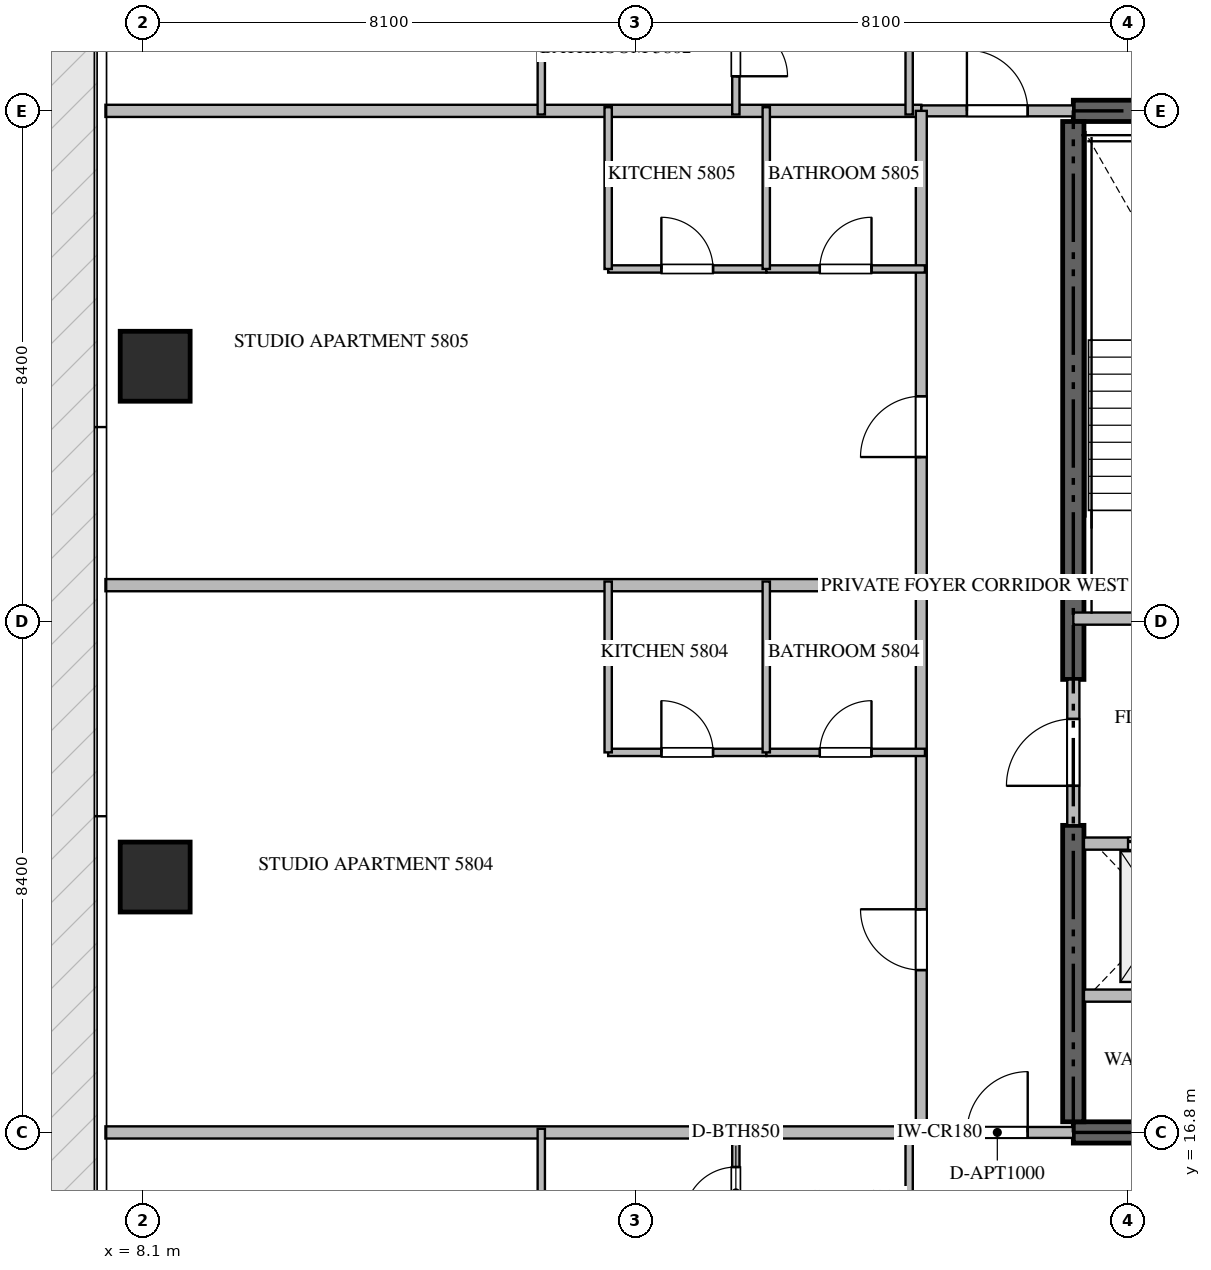
"""IFC4 building model, lengths in metres.
Left out: names, types, materials, properties, quantities, classifications, styles, units other than length and angle.
Written with IfcOpenShell. Run it as: python <this file> out.ifc"""

import sys

from ifc_helpers import new_model, si_unit, direction, frame, frame_2d, origin, origin_2d, place, context, subcontext, project, spatial, rectangle, extrude, source, transform, mapped, element, fill, save


model = new_model("IFC4")
c1 = context("Model", 3, precision=1e-05, world=origin(), true_north=direction((0.0, 1.0)))
c2 = subcontext(c1, "Body", "Model", "MODEL_VIEW")
j1 = project(units=[si_unit("LENGTHUNIT", "METRE"), si_unit("PLANEANGLEUNIT", "RADIAN")], contexts=[c1])
p1 = place(None, origin())
s1 = spatial("IfcSite", under=j1, at=p1, CompositionType="ELEMENT")
p2 = place(p1, origin())
s2 = spatial("IfcBuilding", under=s1, at=p2, CompositionType="ELEMENT")
p3 = place(p2, frame((0.0, 0.0, 233.55)))
s3 = spatial("IfcBuildingStorey", under=s2, at=p3, CompositionType="ELEMENT", Elevation=233.55)
for number, where, z_axis, x_axis in (
    (1, (23.4, 16.8, -0.26), (0.0, 0.0, 1.0), (1.0, 0.0, 0.0)),
    (2, (41.4, 33.6, -0.26), (0.0, 0.0, 1.0), (-1.0, 0.0, 0.0)),
):
    element("IfcWall", number, at=place(p3, frame(where, z_axis=z_axis, x_axis=x_axis)), inside=s3, PredefinedType="SHEAR", context=c2, shape_type="SweptSolid", body=[
        extrude(rectangle(XDim=18.0, YDim=0.35, at=frame_2d((9.0, 0.0))), origin(), (0.0, 0.0, 1.0), 3.848),
    ])
p4 = place(p3, frame((23.4, 16.975, -0.26), z_axis=(0.0, 0.0, 1.0), x_axis=(0.0, 1.0, 0.0)))
e3 = element("IfcWall", 3, at=p4, inside=s3, PredefinedType="SHEAR", context=c2, shape_type="SweptSolid", body=[
    extrude(rectangle(XDim=4.875, YDim=0.35, at=frame_2d((2.438, 0.0))), origin(), (0.0, 0.0, 1.0), 3.848),
])
p5 = place(p3, frame((23.4, 24.25, -0.26), z_axis=(0.0, 0.0, 1.0), x_axis=(0.0, 1.0, 0.0)))
e4 = element("IfcWall", 4, at=p5, inside=s3, PredefinedType="SHEAR", context=c2, shape_type="SweptSolid", body=[
    extrude(rectangle(XDim=9.175, YDim=0.35, at=frame_2d((4.587, 0.0))), origin(), (0.0, 0.0, 1.0), 3.848),
])
m1 = source(origin(), c2, "Body", "SweptSolid", [
    extrude(rectangle(XDim=1.15, YDim=1.15, at=origin_2d()), origin(), (0.0, 0.0, 1.0), 3.85),
])
for number, where, z_axis, x_axis in (
    (5, (8.3, 21.0, -0.26), (0.0, 0.0, 1.0), (1.0, 0.0, 0.0)),
    (6, (8.3, 29.4, -0.26), (0.0, 0.0, 1.0), (1.0, 0.0, 0.0)),
):
    element("IfcColumn", number, at=place(p3, frame(where, z_axis=z_axis, x_axis=x_axis)), inside=s3, PredefinedType="COLUMN", context=c2, shape_type="MappedRepresentation", body=[
        mapped(m1, transform((0.0, 0.0, 0.0), scale=1.0)),
    ])
p6 = place(p3, frame((23.4, 25.25, 0.0), z_axis=(0.0, 0.0, 1.0), x_axis=(1.0, 0.0, 0.0)))
e7 = element("IfcWall", 7, at=p6, inside=s3, PredefinedType="STANDARD", context=c2, shape_type="SweptSolid", body=[
    extrude(rectangle(XDim=4.45, YDim=0.2, at=frame_2d((2.225, 0.0))), origin(), (0.0, 0.0, 1.0), 3.59),
])
p7 = place(p6, frame((1.65, 0.0, 0.0)))
e8 = element("IfcOpeningElement", 8, at=p7, cuts=e7, PredefinedType="OPENING", context=c2, shape_type="SweptSolid", body=[
    extrude(rectangle(XDim=1.1, YDim=2.15, at=frame_2d((0.55, 1.075))), frame((0.0, 0.11, 0.0), z_axis=(0.0, -1.0, 0.0), x_axis=(1.0, 0.0, 0.0)), (0.0, 0.0, 1.0), 0.22),
])
p8 = place(p3, frame((23.575, 21.55, 0.0), z_axis=(0.0, 0.0, 1.0), x_axis=(1.0, 0.0, 0.0)))
e9 = element("IfcWall", 9, at=p8, inside=s3, PredefinedType="STANDARD", context=c2, shape_type="SweptSolid", body=[
    extrude(rectangle(XDim=2.475, YDim=0.2, at=frame_2d((1.238, 0.0))), origin(), (0.0, 0.0, 1.0), 3.59),
])
p9 = place(p8, frame((0.725, 0.0, 0.0)))
e10 = element("IfcOpeningElement", 10, at=p9, cuts=e9, PredefinedType="OPENING", context=c2, shape_type="SweptSolid", body=[
    extrude(rectangle(XDim=1.2, YDim=2.2, at=frame_2d((0.6, 1.1))), frame((0.0, 0.11, 0.0), z_axis=(0.0, -1.0, 0.0), x_axis=(1.0, 0.0, 0.0)), (0.0, 0.0, 1.0), 0.22),
])
p10 = place(p3, frame((23.575, 19.05, 0.0), z_axis=(0.0, 0.0, 1.0), x_axis=(1.0, 0.0, 0.0)))
e11 = element("IfcWall", 11, at=p10, inside=s3, PredefinedType="STANDARD", context=c2, shape_type="SweptSolid", body=[
    extrude(rectangle(XDim=2.475, YDim=0.2, at=frame_2d((1.238, 0.0))), origin(), (0.0, 0.0, 1.0), 3.59),
])
p11 = place(p3, frame((23.4, 21.852, 0.0), z_axis=(0.0, 0.0, 1.0), x_axis=(0.0, 1.0, 0.0)))
e12 = element("IfcWall", 12, at=p11, inside=s3, PredefinedType="STANDARD", context=c2, shape_type="SweptSolid", body=[
    extrude(rectangle(XDim=2.396, YDim=0.2, at=frame_2d((1.198, 0.0))), origin(), (0.0, 0.0, 1.0), 3.59),
])
p12 = place(p11, frame((0.648, 0.0, 0.0)))
e13 = element("IfcOpeningElement", 13, at=p12, cuts=e12, PredefinedType="OPENING", context=c2, shape_type="SweptSolid", body=[
    extrude(rectangle(XDim=1.1, YDim=2.15, at=frame_2d((0.55, 1.075))), frame((0.0, 0.11, 0.0), z_axis=(0.0, -1.0, 0.0), x_axis=(1.0, 0.0, 0.0)), (0.0, 0.0, 1.0), 0.22),
])
p13 = place(p3, frame((7.482, 25.8, 0.0), z_axis=(0.0, 0.0, 1.0), x_axis=(1.0, 0.0, 0.0)))
e14 = element("IfcWall", 14, at=p13, inside=s3, PredefinedType="PARTITIONING", context=c2, shape_type="SweptSolid", body=[
    extrude(rectangle(XDim=13.538, YDim=0.2, at=frame_2d((6.769, 0.0))), origin(), (0.0, 0.0, 1.0), 3.59),
])
for number, where, z_axis, x_axis in (
    (15, (7.482, 16.8, 0.0), (0.0, 0.0, 1.0), (1.0, 0.0, 0.0)),
    (16, (7.482, 33.6, 0.0), (0.0, 0.0, 1.0), (1.0, 0.0, 0.0)),
):
    element("IfcWall", number, at=place(p3, frame(where, z_axis=z_axis, x_axis=x_axis)), inside=s3, PredefinedType="PARTITIONING", context=c2, shape_type="SweptSolid", body=[
        extrude(rectangle(XDim=13.418, YDim=0.2, at=frame_2d((6.709, 0.0))), origin(), (0.0, 0.0, 1.0), 3.59),
    ])
p14 = place(p3, frame((20.902, 16.8, 0.0), z_axis=(0.0, 0.0, 1.0), x_axis=(1.0, 0.0, 0.0)))
e17 = element("IfcWall", 17, at=p14, inside=s3, PredefinedType="PARTITIONING", context=c2, shape_type="SweptSolid", body=[
    extrude(rectangle(XDim=2.496, YDim=0.18, at=frame_2d((1.248, 0.0))), origin(), (0.0, 0.0, 1.0), 3.59),
])
p15 = place(p14, frame((0.748, 0.0, 0.0)))
e18 = element("IfcOpeningElement", 18, at=p15, cuts=e17, PredefinedType="OPENING", context=c2, shape_type="SweptSolid", body=[
    extrude(rectangle(XDim=1.0, YDim=2.15, at=frame_2d((0.5, 1.075))), frame((0.0, 0.1, 0.0), z_axis=(0.0, -1.0, 0.0), x_axis=(1.0, 0.0, 0.0)), (0.0, 0.0, 1.0), 0.2),
])
p16 = place(p3, frame((20.902, 33.6, 0.0), z_axis=(0.0, 0.0, 1.0), x_axis=(1.0, 0.0, 0.0)))
e19 = element("IfcWall", 19, at=p16, inside=s3, PredefinedType="PARTITIONING", context=c2, shape_type="SweptSolid", body=[
    extrude(rectangle(XDim=2.496, YDim=0.18, at=frame_2d((1.248, 0.0))), origin(), (0.0, 0.0, 1.0), 3.59),
])
p17 = place(p16, frame((0.748, 0.0, 0.0)))
e20 = element("IfcOpeningElement", 20, at=p17, cuts=e19, PredefinedType="OPENING", context=c2, shape_type="SweptSolid", body=[
    extrude(rectangle(XDim=1.0, YDim=2.15, at=frame_2d((0.5, 1.075))), frame((0.0, 0.1, 0.0), z_axis=(0.0, -1.0, 0.0), x_axis=(1.0, 0.0, 0.0)), (0.0, 0.0, 1.0), 0.2),
])
p18 = place(p3, frame((20.9, 16.8, 0.0), z_axis=(0.0, 0.0, 1.0), x_axis=(0.0, 1.0, 0.0)))
e21 = element("IfcWall", 21, at=p18, inside=s3, PredefinedType="PARTITIONING", context=c2, shape_type="SweptSolid", body=[
    extrude(rectangle(XDim=16.8, YDim=0.18, at=frame_2d((8.4, 0.0))), origin(), (0.0, 0.0, 1.0), 3.59),
])
p19 = place(p18, frame((2.67, 0.0, 0.0)))
e22 = element("IfcOpeningElement", 22, at=p19, cuts=e21, PredefinedType="OPENING", context=c2, shape_type="SweptSolid", body=[
    extrude(rectangle(XDim=1.0, YDim=2.15, at=frame_2d((0.5, 1.075))), frame((0.0, 0.1, 0.0), z_axis=(0.0, -1.0, 0.0), x_axis=(1.0, 0.0, 0.0)), (0.0, 0.0, 1.0), 0.2),
])
p20 = place(p18, frame((11.107, 0.0, 0.0)))
e23 = element("IfcOpeningElement", 23, at=p20, cuts=e21, PredefinedType="OPENING", context=c2, shape_type="SweptSolid", body=[
    extrude(rectangle(XDim=1.0, YDim=2.15, at=frame_2d((0.5, 1.075))), frame((0.0, 0.1, 0.0), z_axis=(0.0, -1.0, 0.0), x_axis=(1.0, 0.0, 0.0)), (0.0, 0.0, 1.0), 0.2),
])
p21 = place(p3, frame((20.7, 14.05, 0.0), z_axis=(0.0, 0.0, 1.0), x_axis=(0.0, 1.0, 0.0)))
e24 = element("IfcWall", 24, at=p21, inside=s3, PredefinedType="PARTITIONING", context=c2, shape_type="SweptSolid", body=[
    extrude(rectangle(XDim=2.81, YDim=0.12, at=frame_2d((1.405, 0.0))), origin(), (0.0, 0.0, 1.0), 3.59),
])
p22 = place(p3, frame((14.65, 14.75, 0.0), z_axis=(0.0, 0.0, 1.0), x_axis=(0.0, 1.0, 0.0)))
e25 = element("IfcWall", 25, at=p22, inside=s3, PredefinedType="PARTITIONING", context=c2, shape_type="SweptSolid", body=[
    extrude(rectangle(XDim=2.11, YDim=0.12, at=frame_2d((1.055, 0.0))), origin(), (0.0, 0.0, 1.0), 3.59),
])
p23 = place(p3, frame((17.85, 14.752, 0.0), z_axis=(0.0, 0.0, 1.0), x_axis=(0.0, 1.0, 0.0)))
e26 = element("IfcWall", 26, at=p23, inside=s3, PredefinedType="PARTITIONING", context=c2, shape_type="SweptSolid", body=[
    extrude(rectangle(XDim=2.108, YDim=0.12, at=frame_2d((1.054, 0.0))), origin(), (0.0, 0.0, 1.0), 3.59),
])
p24 = place(p23, frame((0.629, 0.0, 0.0)))
e27 = element("IfcOpeningElement", 27, at=p24, cuts=e26, PredefinedType="OPENING", context=c2, shape_type="SweptSolid", body=[
    extrude(rectangle(XDim=0.85, YDim=2.1, at=frame_2d((0.425, 1.05))), frame((0.0, 0.07, 0.0), z_axis=(0.0, -1.0, 0.0), x_axis=(1.0, 0.0, 0.0)), (0.0, 0.0, 1.0), 0.14),
])
p25 = place(p3, frame((20.7, 36.35, 0.0), z_axis=(0.0, 0.0, 1.0), x_axis=(0.0, -1.0, 0.0)))
e28 = element("IfcWall", 28, at=p25, inside=s3, PredefinedType="PARTITIONING", context=c2, shape_type="SweptSolid", body=[
    extrude(rectangle(XDim=2.81, YDim=0.12, at=frame_2d((1.405, 0.0))), origin(), (0.0, 0.0, 1.0), 3.59),
])
p26 = place(p3, frame((14.65, 35.65, 0.0), z_axis=(0.0, 0.0, 1.0), x_axis=(0.0, -1.0, 0.0)))
e29 = element("IfcWall", 29, at=p26, inside=s3, PredefinedType="PARTITIONING", context=c2, shape_type="SweptSolid", body=[
    extrude(rectangle(XDim=2.11, YDim=0.12, at=frame_2d((1.055, 0.0))), origin(), (0.0, 0.0, 1.0), 3.59),
])
p27 = place(p3, frame((17.85, 35.648, 0.0), z_axis=(0.0, 0.0, 1.0), x_axis=(0.0, -1.0, 0.0)))
e30 = element("IfcWall", 30, at=p27, inside=s3, PredefinedType="PARTITIONING", context=c2, shape_type="SweptSolid", body=[
    extrude(rectangle(XDim=2.108, YDim=0.12, at=frame_2d((1.054, 0.0))), origin(), (0.0, 0.0, 1.0), 3.59),
])
p28 = place(p27, frame((0.629, 0.0, 0.0)))
e31 = element("IfcOpeningElement", 31, at=p28, cuts=e30, PredefinedType="OPENING", context=c2, shape_type="SweptSolid", body=[
    extrude(rectangle(XDim=0.85, YDim=2.1, at=frame_2d((0.425, 1.05))), frame((0.0, 0.07, 0.0), z_axis=(0.0, -1.0, 0.0), x_axis=(1.0, 0.0, 0.0)), (0.0, 0.0, 1.0), 0.14),
])
p29 = place(p3, frame((15.75, 23.05, 0.0), z_axis=(0.0, 0.0, 1.0), x_axis=(1.0, 0.0, 0.0)))
e32 = element("IfcWall", 32, at=p29, inside=s3, PredefinedType="PARTITIONING", context=c2, shape_type="SweptSolid", body=[
    extrude(rectangle(XDim=2.6, YDim=0.12, at=frame_2d((1.3, 0.0))), origin(), (0.0, 0.0, 1.0), 3.59),
])
p30 = place(p29, frame((0.875, 0.0, 0.0)))
e33 = element("IfcOpeningElement", 33, at=p30, cuts=e32, PredefinedType="OPENING", context=c2, shape_type="SweptSolid", body=[
    extrude(rectangle(XDim=0.85, YDim=2.1, at=frame_2d((0.425, 1.05))), frame((0.0, 0.07, 0.0), z_axis=(0.0, -1.0, 0.0), x_axis=(1.0, 0.0, 0.0)), (0.0, 0.0, 1.0), 0.14),
])
p31 = place(p3, frame((18.352, 23.05, 0.0), z_axis=(0.0, 0.0, 1.0), x_axis=(1.0, 0.0, 0.0)))
e34 = element("IfcWall", 34, at=p31, inside=s3, PredefinedType="PARTITIONING", context=c2, shape_type="SweptSolid", body=[
    extrude(rectangle(XDim=2.608, YDim=0.12, at=frame_2d((1.304, 0.0))), origin(), (0.0, 0.0, 1.0), 3.59),
])
p32 = place(p31, frame((0.879, 0.0, 0.0)))
e35 = element("IfcOpeningElement", 35, at=p32, cuts=e34, PredefinedType="OPENING", context=c2, shape_type="SweptSolid", body=[
    extrude(rectangle(XDim=0.85, YDim=2.1, at=frame_2d((0.425, 1.05))), frame((0.0, 0.07, 0.0), z_axis=(0.0, -1.0, 0.0), x_axis=(1.0, 0.0, 0.0)), (0.0, 0.0, 1.0), 0.14),
])
for number, where, z_axis, x_axis in (
    (36, (18.35, 23.05, 0.0), (0.0, 0.0, 1.0), (0.0, 1.0, 0.0)),
    (37, (15.75, 23.05, 0.0), (0.0, 0.0, 1.0), (0.0, 1.0, 0.0)),
):
    element("IfcWall", number, at=place(p3, frame(where, z_axis=z_axis, x_axis=x_axis)), inside=s3, PredefinedType="PARTITIONING", context=c2, shape_type="SweptSolid", body=[
        extrude(rectangle(XDim=2.81, YDim=0.12, at=frame_2d((1.405, 0.0))), origin(), (0.0, 0.0, 1.0), 3.59),
    ])
p33 = place(p3, frame((15.75, 31.0, 0.0), z_axis=(0.0, 0.0, 1.0), x_axis=(1.0, 0.0, 0.0)))
e38 = element("IfcWall", 38, at=p33, inside=s3, PredefinedType="PARTITIONING", context=c2, shape_type="SweptSolid", body=[
    extrude(rectangle(XDim=2.6, YDim=0.12, at=frame_2d((1.3, 0.0))), origin(), (0.0, 0.0, 1.0), 3.59),
])
p34 = place(p33, frame((0.875, 0.0, 0.0)))
e39 = element("IfcOpeningElement", 39, at=p34, cuts=e38, PredefinedType="OPENING", context=c2, shape_type="SweptSolid", body=[
    extrude(rectangle(XDim=0.85, YDim=2.1, at=frame_2d((0.425, 1.05))), frame((0.0, 0.07, 0.0), z_axis=(0.0, -1.0, 0.0), x_axis=(1.0, 0.0, 0.0)), (0.0, 0.0, 1.0), 0.14),
])
p35 = place(p3, frame((18.352, 31.0, 0.0), z_axis=(0.0, 0.0, 1.0), x_axis=(1.0, 0.0, 0.0)))
e40 = element("IfcWall", 40, at=p35, inside=s3, PredefinedType="PARTITIONING", context=c2, shape_type="SweptSolid", body=[
    extrude(rectangle(XDim=2.608, YDim=0.12, at=frame_2d((1.304, 0.0))), origin(), (0.0, 0.0, 1.0), 3.59),
])
p36 = place(p35, frame((0.879, 0.0, 0.0)))
e41 = element("IfcOpeningElement", 41, at=p36, cuts=e40, PredefinedType="OPENING", context=c2, shape_type="SweptSolid", body=[
    extrude(rectangle(XDim=0.85, YDim=2.1, at=frame_2d((0.425, 1.05))), frame((0.0, 0.07, 0.0), z_axis=(0.0, -1.0, 0.0), x_axis=(1.0, 0.0, 0.0)), (0.0, 0.0, 1.0), 0.14),
])
for number, where, z_axis, x_axis in (
    (42, (18.35, 31.0, 0.0), (0.0, 0.0, 1.0), (0.0, 1.0, 0.0)),
    (43, (15.75, 31.0, 0.0), (0.0, 0.0, 1.0), (0.0, 1.0, 0.0)),
):
    element("IfcWall", number, at=place(p3, frame(where, z_axis=z_axis, x_axis=x_axis)), inside=s3, PredefinedType="PARTITIONING", context=c2, shape_type="SweptSolid", body=[
        extrude(rectangle(XDim=2.66, YDim=0.12, at=frame_2d((1.33, 0.0))), origin(), (0.0, 0.0, 1.0), 3.59),
    ])
m2 = source(origin(), c2, "Body", "SweptSolid", [
    extrude(rectangle(XDim=1.2, YDim=2.2, at=frame_2d((0.6, 1.1))), frame((0.0, 0.025, 0.0), z_axis=(0.0, -1.0, 0.0), x_axis=(1.0, 0.0, 0.0)), (0.0, 0.0, 1.0), 0.05),
])
p37 = place(p9, origin())
e44 = element("IfcDoor", 44, at=p37, inside=s3, OperationType="DOUBLE_DOOR_SLIDING", PredefinedType="DOOR", context=c2, shape_type="MappedRepresentation", body=[
    mapped(m2, transform((0.0, 0.0, 0.0), scale=1.0)),
])
fill(e10, e44)
m3 = source(origin(), c2, "Body", "SweptSolid", [
    extrude(rectangle(XDim=1.1, YDim=2.15, at=frame_2d((0.55, 1.075))), frame((0.0, 0.025, 0.0), z_axis=(0.0, -1.0, 0.0), x_axis=(1.0, 0.0, 0.0)), (0.0, 0.0, 1.0), 0.05),
])
p38 = place(p12, origin())
e45 = element("IfcDoor", 45, at=p38, inside=s3, OperationType="SINGLE_SWING_LEFT", PredefinedType="DOOR", context=c2, shape_type="MappedRepresentation", body=[
    mapped(m3, transform((0.0, 0.0, 0.0), scale=1.0)),
])
fill(e13, e45)
m4 = source(origin(), c2, "Body", "SweptSolid", [
    extrude(rectangle(XDim=1.0, YDim=2.15, at=frame_2d((0.5, 1.075))), frame((0.0, 0.025, 0.0), z_axis=(0.0, -1.0, 0.0), x_axis=(1.0, 0.0, 0.0)), (0.0, 0.0, 1.0), 0.05),
])
p39 = place(p15, origin())
e46 = element("IfcDoor", 46, at=p39, inside=s3, OperationType="SINGLE_SWING_RIGHT", PredefinedType="DOOR", context=c2, shape_type="MappedRepresentation", body=[
    mapped(m4, transform((0.0, 0.0, 0.0), scale=1.0)),
])
fill(e18, e46)
p40 = place(p17, origin())
e47 = element("IfcDoor", 47, at=p40, inside=s3, OperationType="SINGLE_SWING_LEFT", PredefinedType="DOOR", context=c2, shape_type="MappedRepresentation", body=[
    mapped(m4, transform((0.0, 0.0, 0.0), scale=1.0)),
])
fill(e20, e47)
p41 = place(p19, origin())
e48 = element("IfcDoor", 48, at=p41, inside=s3, OperationType="SINGLE_SWING_RIGHT", PredefinedType="DOOR", context=c2, shape_type="MappedRepresentation", body=[
    mapped(m4, transform((0.0, 0.0, 0.0), scale=1.0)),
])
fill(e22, e48)
p42 = place(p20, origin())
e49 = element("IfcDoor", 49, at=p42, inside=s3, OperationType="SINGLE_SWING_LEFT", PredefinedType="DOOR", context=c2, shape_type="MappedRepresentation", body=[
    mapped(m4, transform((0.0, 0.0, 0.0), scale=1.0)),
])
fill(e23, e49)
m5 = source(origin(), c2, "Body", "SweptSolid", [
    extrude(rectangle(XDim=0.85, YDim=2.1, at=frame_2d((0.425, 1.05))), frame((0.0, 0.025, 0.0), z_axis=(0.0, -1.0, 0.0), x_axis=(1.0, 0.0, 0.0)), (0.0, 0.0, 1.0), 0.05),
])
p43 = place(p24, origin())
e50 = element("IfcDoor", 50, at=p43, inside=s3, OperationType="SINGLE_SWING_LEFT", PredefinedType="DOOR", context=c2, shape_type="MappedRepresentation", body=[
    mapped(m5, transform((0.0, 0.0, 0.0), scale=1.0)),
])
fill(e27, e50)
p44 = place(p28, origin())
e51 = element("IfcDoor", 51, at=p44, inside=s3, OperationType="SINGLE_SWING_RIGHT", PredefinedType="DOOR", context=c2, shape_type="MappedRepresentation", body=[
    mapped(m5, transform((0.0, 0.0, 0.0), scale=1.0)),
])
fill(e31, e51)
p45 = place(p30, origin())
e52 = element("IfcDoor", 52, at=p45, inside=s3, OperationType="SINGLE_SWING_LEFT", PredefinedType="DOOR", context=c2, shape_type="MappedRepresentation", body=[
    mapped(m5, transform((0.0, 0.0, 0.0), scale=1.0)),
])
fill(e33, e52)
p46 = place(p32, origin())
e53 = element("IfcDoor", 53, at=p46, inside=s3, OperationType="SINGLE_SWING_RIGHT", PredefinedType="DOOR", context=c2, shape_type="MappedRepresentation", body=[
    mapped(m5, transform((0.0, 0.0, 0.0), scale=1.0)),
])
fill(e35, e53)
p47 = place(p34, origin())
e54 = element("IfcDoor", 54, at=p47, inside=s3, OperationType="SINGLE_SWING_LEFT", PredefinedType="DOOR", context=c2, shape_type="MappedRepresentation", body=[
    mapped(m5, transform((0.0, 0.0, 0.0), scale=1.0)),
])
fill(e39, e54)
p48 = place(p36, origin())
e55 = element("IfcDoor", 55, at=p48, inside=s3, OperationType="SINGLE_SWING_RIGHT", PredefinedType="DOOR", context=c2, shape_type="MappedRepresentation", body=[
    mapped(m5, transform((0.0, 0.0, 0.0), scale=1.0)),
])
fill(e41, e55)
save(model, sys.argv[1])
